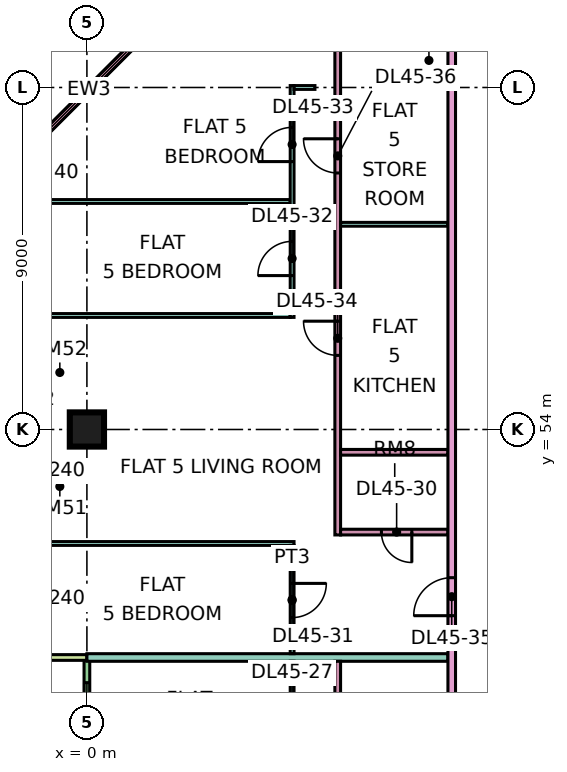
"""IFC4 building model, lengths in metres.
Left out: names, types, materials, properties, quantities, classifications, styles, units other than length and angle.
Written with IfcOpenShell. Run it as: python <this file> out.ifc"""

import sys

from ifc_helpers import new_model, si_unit, direction, frame, frame_2d, origin, origin_2d, place, context, subcontext, project, spatial, rectangle, extrude, element, fill, save


model = new_model("IFC4")
c1 = context("Model", 3, precision=1e-05, world=origin(), true_north=direction((0.0, 1.0)))
c2 = subcontext(c1, "Body", "Model", "MODEL_VIEW")
j1 = project(units=[si_unit("LENGTHUNIT", "METRE"), si_unit("PLANEANGLEUNIT", "RADIAN")], contexts=[c1])
p1 = place(None, origin())
s1 = spatial("IfcSite", under=j1, at=p1, CompositionType="ELEMENT")
p2 = place(p1, origin())
s2 = spatial("IfcBuilding", under=s1, at=p2, CompositionType="ELEMENT")
p3 = place(p2, frame((0.0, 0.0, 194.9)))
s3 = spatial("IfcBuildingStorey", under=s2, at=p3, CompositionType="ELEMENT", Elevation=194.9)
p4 = place(p3, frame((0.0, 54.0, 0.0), z_axis=(0.0, 0.0, 1.0), x_axis=(1.0, 0.0, 0.0)))
e1 = element("IfcColumn", 1, at=p4, inside=s3, PredefinedType="COLUMN", context=c2, shape_type="SweptSolid", body=[
    extrude(rectangle(XDim=0.9, YDim=0.9, at=origin_2d()), origin(), (0.0, 0.0, 1.0), 3.75),
])
p5 = place(p3, frame((1.553, 64.447, 0.0), z_axis=(0.0, 0.0, 1.0), x_axis=(-0.707106781187, -0.707106781187, 0.0)))
e2 = element("IfcWall", 2, at=p5, inside=s3, PredefinedType="SOLIDWALL", context=c2, shape_type="SweptSolid", body=[
    extrude(rectangle(XDim=4.243, YDim=0.15, at=frame_2d((2.121, 0.0))), origin(), (0.0, 0.0, 1.0), 3.35),
])
p6 = place(p5, frame((0.621, 0.0, 0.45)))
e3 = element("IfcOpeningElement", 3, at=p6, cuts=e2, PredefinedType="OPENING", context=c2, shape_type="SweptSolid", body=[
    extrude(rectangle(XDim=3.0, YDim=2.4, at=frame_2d((1.5, 1.2))), frame((0.0, 0.085, 0.0), z_axis=(0.0, -1.0, 0.0), x_axis=(1.0, 0.0, 0.0)), (0.0, 0.0, 1.0), 0.17),
])
p7 = place(p3, frame((0.0, 47.925, 0.0), z_axis=(0.0, 0.0, 1.0), x_axis=(0.0, -1.0, 0.0)))
e4 = element("IfcWall", 4, at=p7, inside=s3, PredefinedType="SOLIDWALL", context=c2, shape_type="SweptSolid", body=[
    extrude(rectangle(XDim=11.85, YDim=0.15, at=frame_2d((5.925, 0.0))), origin(), (0.0, 0.0, 1.0), 3.35),
])
p8 = place(p7, frame((0.587, 0.0, 0.45)))
e5 = element("IfcOpeningElement", 5, at=p8, cuts=e4, PredefinedType="OPENING", context=c2, shape_type="SweptSolid", body=[
    extrude(rectangle(XDim=1.2, YDim=2.4, at=frame_2d((0.6, 1.2))), frame((0.0, 0.085, 0.0), z_axis=(0.0, -1.0, 0.0), x_axis=(1.0, 0.0, 0.0)), (0.0, 0.0, 1.0), 0.17),
])
p9 = place(p7, frame((5.3, 0.0, 0.0)))
e6 = element("IfcOpeningElement", 6, at=p9, cuts=e4, PredefinedType="OPENING", context=c2, shape_type="SweptSolid", body=[
    extrude(rectangle(XDim=1.8, YDim=2.4, at=frame_2d((0.9, 1.2))), frame((0.0, 0.085, 0.0), z_axis=(0.0, -1.0, 0.0), x_axis=(1.0, 0.0, 0.0)), (0.0, 0.0, 1.0), 0.17),
])
p10 = place(p7, frame((9.55, 0.0, 0.45)))
e7 = element("IfcOpeningElement", 7, at=p10, cuts=e4, PredefinedType="OPENING", context=c2, shape_type="SweptSolid", body=[
    extrude(rectangle(XDim=1.2, YDim=2.4, at=frame_2d((0.6, 1.2))), frame((0.0, 0.085, 0.0), z_axis=(0.0, -1.0, 0.0), x_axis=(1.0, 0.0, 0.0)), (0.0, 0.0, 1.0), 0.17),
])
p11 = place(p3, frame((-1.5, 48.0, 0.0), z_axis=(0.0, 0.0, 1.0), x_axis=(1.0, 0.0, 0.0)))
e8 = element("IfcWall", 8, at=p11, inside=s3, PredefinedType="SOLIDWALL", context=c2, shape_type="SweptSolid", body=[
    extrude(rectangle(XDim=1.5, YDim=0.15, at=frame_2d((0.75, 0.0))), origin(), (0.0, 0.0, 1.0), 3.35),
])
p12 = place(p3, frame((-1.351, 60.0, 0.0), z_axis=(0.0, 0.0, 1.0), x_axis=(1.0, 0.0, 0.0)))
e9 = element("IfcWall", 9, at=p12, inside=s3, PredefinedType="PARTITIONING", context=c2, shape_type="SweptSolid", body=[
    extrude(rectangle(XDim=6.701, YDim=0.1, at=frame_2d((3.351, 0.0))), origin(), (0.0, 0.0, 1.0), 3.35),
])
p13 = place(p3, frame((0.0, 48.0, 0.0), z_axis=(0.0, 0.0, 1.0), x_axis=(1.0, 0.0, 0.0)))
e10 = element("IfcWall", 10, at=p13, inside=s3, PredefinedType="PARTITIONING", context=c2, shape_type="SweptSolid", body=[
    extrude(rectangle(XDim=9.5, YDim=0.2, at=frame_2d((4.75, 0.0))), origin(), (0.0, 0.0, 1.0), 3.35),
])
p14 = place(p3, frame((-1.35, 51.0, 0.0), z_axis=(0.0, 0.0, 1.0), x_axis=(1.0, 0.0, 0.0)))
e11 = element("IfcWall", 11, at=p14, inside=s3, PredefinedType="PARTITIONING", context=c2, shape_type="SweptSolid", body=[
    extrude(rectangle(XDim=6.8, YDim=0.1, at=frame_2d((3.4, 0.0))), origin(), (0.0, 0.0, 1.0), 3.35),
])
p15 = place(p3, frame((-1.35, 57.0, 0.0), z_axis=(0.0, 0.0, 1.0), x_axis=(1.0, 0.0, 0.0)))
e12 = element("IfcWall", 12, at=p15, inside=s3, PredefinedType="PARTITIONING", context=c2, shape_type="SweptSolid", body=[
    extrude(rectangle(XDim=6.7, YDim=0.1, at=frame_2d((3.35, 0.0))), origin(), (0.0, 0.0, 1.0), 3.35),
])
p16 = place(p3, frame((5.4, 45.05, 0.0), z_axis=(0.0, 0.0, 1.0), x_axis=(0.0, 1.0, 0.0)))
e13 = element("IfcWall", 13, at=p16, inside=s3, PredefinedType="PARTITIONING", context=c2, shape_type="SweptSolid", body=[
    extrude(rectangle(XDim=2.85, YDim=0.1, at=frame_2d((1.425, 0.0))), origin(), (0.0, 0.0, 1.0), 3.35),
])
p17 = place(p16, frame((1.0, 0.0, 0.0)))
e14 = element("IfcOpeningElement", 14, at=p17, cuts=e13, PredefinedType="OPENING", context=c2, shape_type="SweptSolid", body=[
    extrude(rectangle(XDim=0.9, YDim=2.1, at=frame_2d((0.45, 1.05))), frame((0.0, 0.06, 0.0), z_axis=(0.0, -1.0, 0.0), x_axis=(1.0, 0.0, 0.0)), (0.0, 0.0, 1.0), 0.12),
])
p18 = place(p3, frame((5.4, 48.1, 0.0), z_axis=(0.0, 0.0, 1.0), x_axis=(0.0, 1.0, 0.0)))
e15 = element("IfcWall", 15, at=p18, inside=s3, PredefinedType="PARTITIONING", context=c2, shape_type="SweptSolid", body=[
    extrude(rectangle(XDim=2.85, YDim=0.1, at=frame_2d((1.425, 0.0))), origin(), (0.0, 0.0, 1.0), 3.35),
])
p19 = place(p18, frame((0.95, 0.0, 0.0)))
e16 = element("IfcOpeningElement", 16, at=p19, cuts=e15, PredefinedType="OPENING", context=c2, shape_type="SweptSolid", body=[
    extrude(rectangle(XDim=0.9, YDim=2.1, at=frame_2d((0.45, 1.05))), frame((0.0, 0.06, 0.0), z_axis=(0.0, -1.0, 0.0), x_axis=(1.0, 0.0, 0.0)), (0.0, 0.0, 1.0), 0.12),
])
p20 = place(p3, frame((5.4, 56.95, 0.0), z_axis=(0.0, 0.0, 1.0), x_axis=(0.0, 1.0, 0.0)))
e17 = element("IfcWall", 17, at=p20, inside=s3, PredefinedType="PARTITIONING", context=c2, shape_type="SweptSolid", body=[
    extrude(rectangle(XDim=6.1, YDim=0.1, at=frame_2d((3.05, 0.0))), origin(), (0.0, 0.0, 1.0), 3.35),
])
p21 = place(p20, frame((1.1, 0.0, 0.0)))
e18 = element("IfcOpeningElement", 18, at=p21, cuts=e17, PredefinedType="OPENING", context=c2, shape_type="SweptSolid", body=[
    extrude(rectangle(XDim=0.9, YDim=2.1, at=frame_2d((0.45, 1.05))), frame((0.0, 0.06, 0.0), z_axis=(0.0, -1.0, 0.0), x_axis=(1.0, 0.0, 0.0)), (0.0, 0.0, 1.0), 0.12),
])
p22 = place(p20, frame((4.1, 0.0, 0.0)))
e19 = element("IfcOpeningElement", 19, at=p22, cuts=e17, PredefinedType="OPENING", context=c2, shape_type="SweptSolid", body=[
    extrude(rectangle(XDim=0.9, YDim=2.1, at=frame_2d((0.45, 1.05))), frame((0.0, 0.06, 0.0), z_axis=(0.0, -1.0, 0.0), x_axis=(1.0, 0.0, 0.0)), (0.0, 0.0, 1.0), 0.12),
])
p23 = place(p3, frame((5.45, 63.0, 0.0), z_axis=(0.0, 0.0, 1.0), x_axis=(1.0, 0.0, 0.0)))
e20 = element("IfcWall", 20, at=p23, inside=s3, PredefinedType="PARTITIONING", context=c2, shape_type="SweptSolid", body=[
    extrude(rectangle(XDim=0.55, YDim=0.1, at=frame_2d((0.275, 0.0))), origin(), (0.0, 0.0, 1.0), 3.35),
])
p24 = place(p3, frame((6.6, 39.225, 0.0), z_axis=(0.0, 0.0, 1.0), x_axis=(0.0, 1.0, 0.0)))
e21 = element("IfcWall", 21, at=p24, inside=s3, PredefinedType="PARTITIONING", context=c2, shape_type="SweptSolid", body=[
    extrude(rectangle(XDim=8.675, YDim=0.15, at=frame_2d((4.337, 0.0))), origin(), (0.0, 0.0, 1.0), 3.35),
])
p25 = place(p24, frame((1.125, 0.0, 0.0)))
e22 = element("IfcOpeningElement", 22, at=p25, cuts=e21, PredefinedType="OPENING", context=c2, shape_type="SweptSolid", body=[
    extrude(rectangle(XDim=0.8, YDim=2.1, at=frame_2d((0.4, 1.05))), frame((0.0, 0.085, 0.0), z_axis=(0.0, -1.0, 0.0), x_axis=(1.0, 0.0, 0.0)), (0.0, 0.0, 1.0), 0.17),
])
p26 = place(p24, frame((5.475, 0.0, 0.0)))
e23 = element("IfcOpeningElement", 23, at=p26, cuts=e21, PredefinedType="OPENING", context=c2, shape_type="SweptSolid", body=[
    extrude(rectangle(XDim=0.9, YDim=2.1, at=frame_2d((0.45, 1.05))), frame((0.0, 0.085, 0.0), z_axis=(0.0, -1.0, 0.0), x_axis=(1.0, 0.0, 0.0)), (0.0, 0.0, 1.0), 0.17),
])
p27 = place(p3, frame((6.6, 51.225, 0.0), z_axis=(0.0, 0.0, 1.0), x_axis=(0.0, 1.0, 0.0)))
e24 = element("IfcWall", 24, at=p27, inside=s3, PredefinedType="PARTITIONING", context=c2, shape_type="SweptSolid", body=[
    extrude(rectangle(XDim=13.125, YDim=0.15, at=frame_2d((6.562, 0.0))), origin(), (0.0, 0.0, 1.0), 3.35),
])
p28 = place(p27, frame((4.725, 0.0, 0.0)))
e25 = element("IfcOpeningElement", 25, at=p28, cuts=e24, PredefinedType="OPENING", context=c2, shape_type="SweptSolid", body=[
    extrude(rectangle(XDim=0.9, YDim=2.1, at=frame_2d((0.45, 1.05))), frame((0.0, 0.085, 0.0), z_axis=(0.0, -1.0, 0.0), x_axis=(1.0, 0.0, 0.0)), (0.0, 0.0, 1.0), 0.17),
])
p29 = place(p27, frame((9.525, 0.0, 0.0)))
e26 = element("IfcOpeningElement", 26, at=p29, cuts=e24, PredefinedType="OPENING", context=c2, shape_type="SweptSolid", body=[
    extrude(rectangle(XDim=0.9, YDim=2.1, at=frame_2d((0.45, 1.05))), frame((0.0, 0.085, 0.0), z_axis=(0.0, -1.0, 0.0), x_axis=(1.0, 0.0, 0.0)), (0.0, 0.0, 1.0), 0.17),
])
p30 = place(p3, frame((6.675, 51.3, 0.0), z_axis=(0.0, 0.0, 1.0), x_axis=(1.0, 0.0, 0.0)))
e27 = element("IfcWall", 27, at=p30, inside=s3, PredefinedType="PARTITIONING", context=c2, shape_type="SweptSolid", body=[
    extrude(rectangle(XDim=2.825, YDim=0.15, at=frame_2d((1.413, 0.0))), origin(), (0.0, 0.0, 1.0), 3.35),
])
p31 = place(p30, frame((1.075, 0.0, 0.0)))
e28 = element("IfcOpeningElement", 28, at=p31, cuts=e27, PredefinedType="OPENING", context=c2, shape_type="SweptSolid", body=[
    extrude(rectangle(XDim=0.8, YDim=2.1, at=frame_2d((0.4, 1.05))), frame((0.0, 0.085, 0.0), z_axis=(0.0, -1.0, 0.0), x_axis=(1.0, 0.0, 0.0)), (0.0, 0.0, 1.0), 0.17),
])
p32 = place(p3, frame((6.675, 53.4, 0.0), z_axis=(0.0, 0.0, 1.0), x_axis=(1.0, 0.0, 0.0)))
e29 = element("IfcWall", 29, at=p32, inside=s3, PredefinedType="PARTITIONING", context=c2, shape_type="SweptSolid", body=[
    extrude(rectangle(XDim=2.825, YDim=0.15, at=frame_2d((1.413, 0.0))), origin(), (0.0, 0.0, 1.0), 3.35),
])
p33 = place(p3, frame((6.675, 59.4, 0.0), z_axis=(0.0, 0.0, 1.0), x_axis=(1.0, 0.0, 0.0)))
e30 = element("IfcWall", 30, at=p33, inside=s3, PredefinedType="PARTITIONING", context=c2, shape_type="SweptSolid", body=[
    extrude(rectangle(XDim=2.825, YDim=0.1, at=frame_2d((1.413, 0.0))), origin(), (0.0, 0.0, 1.0), 3.35),
])
p34 = place(p3, frame((9.6, 20.0, 0.0), z_axis=(0.0, 0.0, 1.0), x_axis=(0.0, 1.0, 0.0)))
e31 = element("IfcWall", 31, at=p34, inside=s3, PredefinedType="PARTITIONING", context=c2, shape_type="SweptSolid", body=[
    extrude(rectangle(XDim=44.35, YDim=0.2, at=frame_2d((22.175, 0.0))), origin(), (0.0, 0.0, 1.0), 3.35),
])
p35 = place(p34, frame((17.1, 0.0, 0.0)))
e32 = element("IfcOpeningElement", 32, at=p35, cuts=e31, PredefinedType="OPENING", context=c2, shape_type="SweptSolid", body=[
    extrude(rectangle(XDim=1.0, YDim=2.1, at=frame_2d((0.5, 1.05))), frame((0.0, 0.11, 0.0), z_axis=(0.0, -1.0, 0.0), x_axis=(1.0, 0.0, 0.0)), (0.0, 0.0, 1.0), 0.22),
])
p36 = place(p34, frame((29.1, 0.0, 0.0)))
e33 = element("IfcOpeningElement", 33, at=p36, cuts=e31, PredefinedType="OPENING", context=c2, shape_type="SweptSolid", body=[
    extrude(rectangle(XDim=1.0, YDim=2.1, at=frame_2d((0.5, 1.05))), frame((0.0, 0.11, 0.0), z_axis=(0.0, -1.0, 0.0), x_axis=(1.0, 0.0, 0.0)), (0.0, 0.0, 1.0), 0.22),
])
p37 = place(p34, frame((0.6, 0.0, 0.0)))
e34 = element("IfcOpeningElement", 34, at=p37, cuts=e31, PredefinedType="OPENING", context=c2, shape_type="SweptSolid", body=[
    extrude(rectangle(XDim=1.2, YDim=2.1, at=frame_2d((0.6, 1.05))), frame((0.0, 0.11, 0.0), z_axis=(0.0, -1.0, 0.0), x_axis=(1.0, 0.0, 0.0)), (0.0, 0.0, 1.0), 0.22),
])
p38 = place(p34, frame((4.35, 0.0, 0.0)))
e35 = element("IfcOpeningElement", 35, at=p38, cuts=e31, PredefinedType="OPENING", context=c2, shape_type="SweptSolid", body=[
    extrude(rectangle(XDim=1.0, YDim=2.1, at=frame_2d((0.5, 1.05))), frame((0.0, 0.11, 0.0), z_axis=(0.0, -1.0, 0.0), x_axis=(1.0, 0.0, 0.0)), (0.0, 0.0, 1.0), 0.22),
])
p39 = place(p6, origin())
e36 = element("IfcWindow", 36, at=p39, inside=s3, PartitioningType="SINGLE_PANEL", PredefinedType="WINDOW", context=c2, shape_type="SweptSolid", body=[
    extrude(rectangle(XDim=3.0, YDim=2.4, at=frame_2d((1.5, 1.2))), frame((0.0, 0.03, 0.0), z_axis=(0.0, -1.0, 0.0), x_axis=(1.0, 0.0, 0.0)), (0.0, 0.0, 1.0), 0.06),
])
fill(e3, e36)
p40 = place(p8, origin())
e37 = element("IfcWindow", 37, at=p40, inside=s3, PartitioningType="SINGLE_PANEL", PredefinedType="WINDOW", context=c2, shape_type="SweptSolid", body=[
    extrude(rectangle(XDim=1.2, YDim=2.4, at=frame_2d((0.6, 1.2))), frame((0.0, 0.03, 0.0), z_axis=(0.0, -1.0, 0.0), x_axis=(1.0, 0.0, 0.0)), (0.0, 0.0, 1.0), 0.06),
])
fill(e5, e37)
p41 = place(p31, origin())
e38 = element("IfcDoor", 38, at=p41, inside=s3, OperationType="SINGLE_SWING_RIGHT", PredefinedType="DOOR", context=c2, shape_type="SweptSolid", body=[
    extrude(rectangle(XDim=0.8, YDim=2.1, at=frame_2d((0.4, 1.05))), frame((0.0, 0.025, 0.0), z_axis=(0.0, -1.0, 0.0), x_axis=(1.0, 0.0, 0.0)), (0.0, 0.0, 1.0), 0.05),
])
fill(e28, e38)
p42 = place(p19, origin())
e39 = element("IfcDoor", 39, at=p42, inside=s3, OperationType="SINGLE_SWING_RIGHT", PredefinedType="DOOR", context=c2, shape_type="SweptSolid", body=[
    extrude(rectangle(XDim=0.9, YDim=2.1, at=frame_2d((0.45, 1.05))), frame((0.0, 0.025, 0.0), z_axis=(0.0, -1.0, 0.0), x_axis=(1.0, 0.0, 0.0)), (0.0, 0.0, 1.0), 0.05),
])
fill(e16, e39)
p43 = place(p21, origin())
e40 = element("IfcDoor", 40, at=p43, inside=s3, OperationType="SINGLE_SWING_LEFT", PredefinedType="DOOR", context=c2, shape_type="SweptSolid", body=[
    extrude(rectangle(XDim=0.9, YDim=2.1, at=frame_2d((0.45, 1.05))), frame((0.0, 0.025, 0.0), z_axis=(0.0, -1.0, 0.0), x_axis=(1.0, 0.0, 0.0)), (0.0, 0.0, 1.0), 0.05),
])
fill(e18, e40)
p44 = place(p22, origin())
e41 = element("IfcDoor", 41, at=p44, inside=s3, OperationType="SINGLE_SWING_LEFT", PredefinedType="DOOR", context=c2, shape_type="SweptSolid", body=[
    extrude(rectangle(XDim=0.9, YDim=2.1, at=frame_2d((0.45, 1.05))), frame((0.0, 0.025, 0.0), z_axis=(0.0, -1.0, 0.0), x_axis=(1.0, 0.0, 0.0)), (0.0, 0.0, 1.0), 0.05),
])
fill(e19, e41)
p45 = place(p28, frame((0.9, 0.0, 0.0), z_axis=(0.0, 0.0, 1.0), x_axis=(-1.0, 0.0, 0.0)))
e42 = element("IfcDoor", 42, at=p45, inside=s3, OperationType="SINGLE_SWING_RIGHT", PredefinedType="DOOR", context=c2, shape_type="SweptSolid", body=[
    extrude(rectangle(XDim=0.9, YDim=2.1, at=frame_2d((0.45, 1.05))), frame((0.0, 0.025, 0.0), z_axis=(0.0, -1.0, 0.0), x_axis=(1.0, 0.0, 0.0)), (0.0, 0.0, 1.0), 0.05),
])
fill(e25, e42)
p46 = place(p36, origin())
e43 = element("IfcDoor", 43, at=p46, inside=s3, OperationType="SINGLE_SWING_LEFT", PredefinedType="DOOR", context=c2, shape_type="SweptSolid", body=[
    extrude(rectangle(XDim=1.0, YDim=2.1, at=frame_2d((0.5, 1.05))), frame((0.0, 0.025, 0.0), z_axis=(0.0, -1.0, 0.0), x_axis=(1.0, 0.0, 0.0)), (0.0, 0.0, 1.0), 0.05),
])
fill(e33, e43)
p47 = place(p29, frame((0.9, 0.0, 0.0), z_axis=(0.0, 0.0, 1.0), x_axis=(-1.0, 0.0, 0.0)))
e44 = element("IfcDoor", 44, at=p47, inside=s3, OperationType="SINGLE_SWING_RIGHT", PredefinedType="DOOR", context=c2, shape_type="SweptSolid", body=[
    extrude(rectangle(XDim=0.9, YDim=2.1, at=frame_2d((0.45, 1.05))), frame((0.0, 0.025, 0.0), z_axis=(0.0, -1.0, 0.0), x_axis=(1.0, 0.0, 0.0)), (0.0, 0.0, 1.0), 0.05),
])
fill(e26, e44)
save(model, sys.argv[1])
